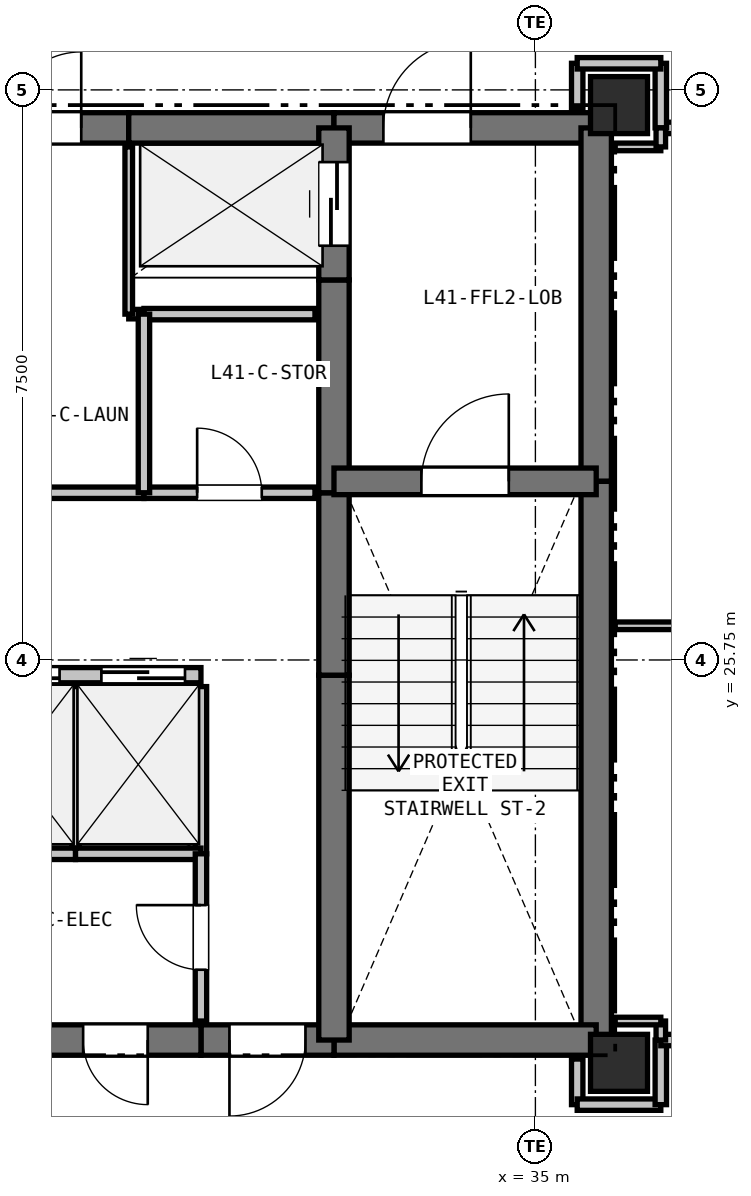
"""IFC4 building model, lengths in metres.
Left out: names, types, materials, properties, quantities, classifications, styles, units other than length and angle.
Written with IfcOpenShell. Run it as: python <this file> out.ifc"""

import sys

from ifc_helpers import new_model, si_unit, direction, frame, frame_2d, origin, origin_2d, place, context, subcontext, project, spatial, rectangle, extrude, element, fill, save


model = new_model("IFC4")
c1 = context("Model", 3, precision=1e-05, world=origin(), true_north=direction((0.0, 1.0)))
c2 = subcontext(c1, "Body", "Model", "MODEL_VIEW")
j1 = project(units=[si_unit("LENGTHUNIT", "METRE"), si_unit("PLANEANGLEUNIT", "RADIAN")], contexts=[c1])
p1 = place(None, origin())
s1 = spatial("IfcSite", under=j1, at=p1, CompositionType="ELEMENT")
p2 = place(p1, origin())
s2 = spatial("IfcBuilding", under=s1, at=p2, CompositionType="ELEMENT")
p3 = place(p2, frame((0.0, 0.0, 147.6)))
s3 = spatial("IfcBuildingStorey", under=s2, at=p3, CompositionType="ELEMENT", Elevation=147.6)
for number, where, z_axis, x_axis in (
    (1, (36.1, 33.05, 0.0), (0.0, 0.0, 1.0), (1.0, 0.0, 0.0)),
    (2, (36.1, 20.45, 0.0), (0.0, 0.0, 1.0), (1.0, 0.0, 0.0)),
):
    element("IfcColumn", number, at=place(p3, frame(where, z_axis=z_axis, x_axis=x_axis)), inside=s3, PredefinedType="COLUMN", context=c2, shape_type="SweptSolid", body=[
        extrude(rectangle(XDim=0.75, YDim=0.75, at=origin_2d()), origin(), (0.0, 0.0, 1.0), 3.3),
    ])
p4 = place(p3, frame((27.4, 32.75, 0.0), z_axis=(0.0, 0.0, 1.0), x_axis=(1.0, 0.0, 0.0)))
e3 = element("IfcWall", 3, at=p4, inside=s3, PredefinedType="SHEAR", context=c2, shape_type="SweptSolid", body=[
    extrude(rectangle(XDim=2.25, YDim=0.4, at=frame_2d((1.125, 0.0))), origin(), (0.0, 0.0, 1.0), 3.06),
])
p5 = place(p4, frame((0.625, 0.0, 0.0)))
e4 = element("IfcOpeningElement", 4, at=p5, cuts=e3, PredefinedType="OPENING", context=c2, shape_type="SweptSolid", body=[
    extrude(rectangle(XDim=1.0, YDim=2.15, at=frame_2d((0.5, 1.075))), frame((0.0, 0.21, 0.0), z_axis=(0.0, -1.0, 0.0), x_axis=(1.0, 0.0, 0.0)), (0.0, 0.0, 1.0), 0.42),
])
p6 = place(p3, frame((29.65, 32.75, 0.0), z_axis=(0.0, 0.0, 1.0), x_axis=(1.0, 0.0, 0.0)))
e5 = element("IfcWall", 5, at=p6, inside=s3, PredefinedType="SHEAR", context=c2, shape_type="SweptSolid", body=[
    extrude(rectangle(XDim=2.7, YDim=0.4, at=frame_2d((1.35, 0.0))), origin(), (0.0, 0.0, 1.0), 3.06),
])
p7 = place(p3, frame((32.35, 32.75, 0.0), z_axis=(0.0, 0.0, 1.0), x_axis=(1.0, 0.0, 0.0)))
e6 = element("IfcWall", 6, at=p7, inside=s3, PredefinedType="SHEAR", context=c2, shape_type="SweptSolid", body=[
    extrude(rectangle(XDim=3.45, YDim=0.4, at=frame_2d((1.725, 0.0))), origin(), (0.0, 0.0, 1.0), 3.06),
])
p8 = place(p7, frame((0.65, 0.0, 0.0)))
e7 = element("IfcOpeningElement", 7, at=p8, cuts=e6, PredefinedType="OPENING", context=c2, shape_type="SweptSolid", body=[
    extrude(rectangle(XDim=1.15, YDim=2.15, at=frame_2d((0.575, 1.075))), frame((0.0, 0.21, 0.0), z_axis=(0.0, -1.0, 0.0), x_axis=(1.0, 0.0, 0.0)), (0.0, 0.0, 1.0), 0.42),
])
p9 = place(p3, frame((35.8, 32.75, 0.0), z_axis=(0.0, 0.0, 1.0), x_axis=(0.0, -1.0, 0.0)))
e8 = element("IfcWall", 8, at=p9, inside=s3, PredefinedType="SHEAR", context=c2, shape_type="SweptSolid", body=[
    extrude(rectangle(XDim=4.65, YDim=0.4, at=frame_2d((2.325, 0.0))), origin(), (0.0, 0.0, 1.0), 3.06),
])
p10 = place(p3, frame((35.8, 28.1, 0.0), z_axis=(0.0, 0.0, 1.0), x_axis=(0.0, -1.0, 0.0)))
e9 = element("IfcWall", 9, at=p10, inside=s3, PredefinedType="SHEAR", context=c2, shape_type="SweptSolid", body=[
    extrude(rectangle(XDim=7.35, YDim=0.4, at=frame_2d((3.675, 0.0))), origin(), (0.0, 0.0, 1.0), 3.06),
])
p11 = place(p3, frame((35.8, 20.75, 0.0), z_axis=(0.0, 0.0, 1.0), x_axis=(-1.0, 0.0, 0.0)))
e10 = element("IfcWall", 10, at=p11, inside=s3, PredefinedType="SHEAR", context=c2, shape_type="SweptSolid", body=[
    extrude(rectangle(XDim=3.45, YDim=0.4, at=frame_2d((1.725, 0.0))), origin(), (0.0, 0.0, 1.0), 3.06),
])
p12 = place(p3, frame((32.35, 20.75, 0.0), z_axis=(0.0, 0.0, 1.0), x_axis=(-1.0, 0.0, 0.0)))
e11 = element("IfcWall", 11, at=p12, inside=s3, PredefinedType="SHEAR", context=c2, shape_type="SweptSolid", body=[
    extrude(rectangle(XDim=1.75, YDim=0.4, at=frame_2d((0.875, 0.0))), origin(), (0.0, 0.0, 1.0), 3.06),
])
p13 = place(p12, frame((0.375, 0.0, 0.0)))
e12 = element("IfcOpeningElement", 12, at=p13, cuts=e11, PredefinedType="OPENING", context=c2, shape_type="SweptSolid", body=[
    extrude(rectangle(XDim=1.0, YDim=2.15, at=frame_2d((0.5, 1.075))), frame((0.0, 0.21, 0.0), z_axis=(0.0, -1.0, 0.0), x_axis=(1.0, 0.0, 0.0)), (0.0, 0.0, 1.0), 0.42),
])
p14 = place(p3, frame((30.6, 20.75, 0.0), z_axis=(0.0, 0.0, 1.0), x_axis=(-1.0, 0.0, 0.0)))
e13 = element("IfcWall", 13, at=p14, inside=s3, PredefinedType="SHEAR", context=c2, shape_type="SweptSolid", body=[
    extrude(rectangle(XDim=2.25, YDim=0.4, at=frame_2d((1.125, 0.0))), origin(), (0.0, 0.0, 1.0), 3.06),
])
p15 = place(p14, frame((0.7, 0.0, 0.0)))
e14 = element("IfcOpeningElement", 14, at=p15, cuts=e13, PredefinedType="OPENING", context=c2, shape_type="SweptSolid", body=[
    extrude(rectangle(XDim=0.85, YDim=2.1, at=frame_2d((0.425, 1.05))), frame((0.0, 0.21, 0.0), z_axis=(0.0, -1.0, 0.0), x_axis=(1.0, 0.0, 0.0)), (0.0, 0.0, 1.0), 0.42),
])
p16 = place(p3, frame((32.35, 20.75, 0.0), z_axis=(0.0, 0.0, 1.0), x_axis=(0.0, 1.0, 0.0)))
e15 = element("IfcWall", 15, at=p16, inside=s3, PredefinedType="SHEAR", context=c2, shape_type="SweptSolid", body=[
    extrude(rectangle(XDim=4.8, YDim=0.4, at=frame_2d((2.4, 0.0))), origin(), (0.0, 0.0, 1.0), 3.06),
])
p17 = place(p3, frame((32.35, 25.55, 0.0), z_axis=(0.0, 0.0, 1.0), x_axis=(0.0, 1.0, 0.0)))
e16 = element("IfcWall", 16, at=p17, inside=s3, PredefinedType="SHEAR", context=c2, shape_type="SweptSolid", body=[
    extrude(rectangle(XDim=2.4, YDim=0.4, at=frame_2d((1.2, 0.0))), origin(), (0.0, 0.0, 1.0), 3.06),
])
p18 = place(p3, frame((32.35, 27.95, 0.0), z_axis=(0.0, 0.0, 1.0), x_axis=(0.0, 1.0, 0.0)))
e17 = element("IfcWall", 17, at=p18, inside=s3, PredefinedType="SHEAR", context=c2, shape_type="SweptSolid", body=[
    extrude(rectangle(XDim=2.8, YDim=0.4, at=frame_2d((1.4, 0.0))), origin(), (0.0, 0.0, 1.0), 3.06),
])
p19 = place(p3, frame((32.35, 30.75, 0.0), z_axis=(0.0, 0.0, 1.0), x_axis=(0.0, 1.0, 0.0)))
e18 = element("IfcWall", 18, at=p19, inside=s3, PredefinedType="SHEAR", context=c2, shape_type="SweptSolid", body=[
    extrude(rectangle(XDim=2.0, YDim=0.4, at=frame_2d((1.0, 0.0))), origin(), (0.0, 0.0, 1.0), 3.06),
])
p20 = place(p19, frame((0.45, 0.0, 0.0)))
e19 = element("IfcOpeningElement", 19, at=p20, cuts=e18, PredefinedType="OPENING", context=c2, shape_type="SweptSolid", body=[
    extrude(rectangle(XDim=1.1, YDim=2.15, at=frame_2d((0.55, 1.075))), frame((0.0, 0.21, 0.0), z_axis=(0.0, -1.0, 0.0), x_axis=(1.0, 0.0, 0.0)), (0.0, 0.0, 1.0), 0.42),
])
p21 = place(p3, frame((32.35, 28.1, 0.0), z_axis=(0.0, 0.0, 1.0), x_axis=(1.0, 0.0, 0.0)))
e20 = element("IfcWall", 20, at=p21, inside=s3, PredefinedType="SHEAR", context=c2, shape_type="SweptSolid", body=[
    extrude(rectangle(XDim=3.45, YDim=0.35, at=frame_2d((1.725, 0.0))), origin(), (0.0, 0.0, 1.0), 3.06),
])
p22 = place(p21, frame((1.15, 0.0, 0.0)))
e21 = element("IfcOpeningElement", 21, at=p22, cuts=e20, PredefinedType="OPENING", context=c2, shape_type="SweptSolid", body=[
    extrude(rectangle(XDim=1.15, YDim=2.15, at=frame_2d((0.575, 1.075))), frame((0.0, 0.185, 0.0), z_axis=(0.0, -1.0, 0.0), x_axis=(1.0, 0.0, 0.0)), (0.0, 0.0, 1.0), 0.37),
])
p23 = place(p3, frame((25.65, 25.55, 0.0), z_axis=(0.0, 0.0, 1.0), x_axis=(1.0, 0.0, 0.0)))
e22 = element("IfcWall", 22, at=p23, inside=s3, PredefinedType="PARTITIONING", context=c2, shape_type="SweptSolid", body=[
    extrude(rectangle(XDim=4.95, YDim=0.2, at=frame_2d((2.475, 0.0))), origin(), (0.0, 0.0, 1.0), 3.06),
])
p24 = place(p23, frame((0.34, 0.0, 0.0)))
e23 = element("IfcOpeningElement", 23, at=p24, cuts=e22, PredefinedType="OPENING", context=c2, shape_type="SweptSolid", body=[
    extrude(rectangle(XDim=1.1, YDim=2.15, at=frame_2d((0.55, 1.075))), frame((0.0, 0.11, 0.0), z_axis=(0.0, -1.0, 0.0), x_axis=(1.0, 0.0, 0.0)), (0.0, 0.0, 1.0), 0.22),
])
p25 = place(p23, frame((1.99, 0.0, 0.0)))
e24 = element("IfcOpeningElement", 24, at=p25, cuts=e22, PredefinedType="OPENING", context=c2, shape_type="SweptSolid", body=[
    extrude(rectangle(XDim=1.1, YDim=2.15, at=frame_2d((0.55, 1.075))), frame((0.0, 0.11, 0.0), z_axis=(0.0, -1.0, 0.0), x_axis=(1.0, 0.0, 0.0)), (0.0, 0.0, 1.0), 0.22),
])
p26 = place(p23, frame((3.64, 0.0, 0.0)))
e25 = element("IfcOpeningElement", 25, at=p26, cuts=e22, PredefinedType="OPENING", context=c2, shape_type="SweptSolid", body=[
    extrude(rectangle(XDim=1.1, YDim=2.15, at=frame_2d((0.55, 1.075))), frame((0.0, 0.11, 0.0), z_axis=(0.0, -1.0, 0.0), x_axis=(1.0, 0.0, 0.0)), (0.0, 0.0, 1.0), 0.22),
])
p27 = place(p3, frame((32.1, 30.3, 0.0), z_axis=(0.0, 0.0, 1.0), x_axis=(-1.0, 0.0, 0.0)))
e26 = element("IfcWall", 26, at=p27, inside=s3, PredefinedType="PARTITIONING", context=c2, shape_type="SweptSolid", body=[
    extrude(rectangle(XDim=2.25, YDim=0.15, at=frame_2d((1.125, 0.0))), origin(), (0.0, 0.0, 1.0), 3.06),
])
p28 = place(p3, frame((29.85, 30.3, 0.0), z_axis=(0.0, 0.0, 1.0), x_axis=(-1.0, 0.0, 0.0)))
e27 = element("IfcWall", 27, at=p28, inside=s3, PredefinedType="PARTITIONING", context=c2, shape_type="SweptSolid", body=[
    extrude(rectangle(XDim=0.2, YDim=0.125, at=frame_2d((0.1, 0.0))), origin(), (0.0, 0.0, 1.0), 3.06),
])
for number, where, z_axis, x_axis in (
    (28, (29.65, 30.3, 0.0), (0.0, 0.0, 1.0), (0.0, 1.0, 0.0)),
    (29, (28.95, 25.4, 0.0), (0.0, 0.0, 1.0), (0.0, -1.0, 0.0)),
):
    element("IfcWall", number, at=place(p3, frame(where, z_axis=z_axis, x_axis=x_axis)), inside=s3, PredefinedType="PARTITIONING", context=c2, shape_type="SweptSolid", body=[
        extrude(rectangle(XDim=2.2, YDim=0.1, at=frame_2d((1.1, 0.0))), origin(), (0.0, 0.0, 1.0), 3.06),
    ])
p29 = place(p3, frame((28.95, 23.2, 0.0), z_axis=(0.0, 0.0, 1.0), x_axis=(-1.0, 0.0, 0.0)))
e30 = element("IfcWall", 30, at=p29, inside=s3, PredefinedType="PARTITIONING", context=c2, shape_type="SweptSolid", body=[
    extrude(rectangle(XDim=0.6, YDim=0.15, at=frame_2d((0.3, 0.0))), origin(), (0.0, 0.0, 1.0), 3.06),
])
p30 = place(p3, frame((30.6, 25.4, 0.0), z_axis=(0.0, 0.0, 1.0), x_axis=(0.0, -1.0, 0.0)))
e31 = element("IfcWall", 31, at=p30, inside=s3, PredefinedType="PARTITIONING", context=c2, shape_type="SweptSolid", body=[
    extrude(rectangle(XDim=2.2, YDim=0.15, at=frame_2d((1.1, 0.0))), origin(), (0.0, 0.0, 1.0), 3.06),
])
p31 = place(p3, frame((30.6, 23.2, 0.0), z_axis=(0.0, 0.0, 1.0), x_axis=(-1.0, 0.0, 0.0)))
e32 = element("IfcWall", 32, at=p31, inside=s3, PredefinedType="PARTITIONING", context=c2, shape_type="SweptSolid", body=[
    extrude(rectangle(XDim=1.65, YDim=0.15, at=frame_2d((0.825, 0.0))), origin(), (0.0, 0.0, 1.0), 3.06),
])
p32 = place(p3, frame((30.6, 21.0, 0.0), z_axis=(0.0, 0.0, 1.0), x_axis=(0.0, 1.0, 0.0)))
e33 = element("IfcWall", 33, at=p32, inside=s3, PredefinedType="PARTITIONING", context=c2, shape_type="SweptSolid", body=[
    extrude(rectangle(XDim=2.2, YDim=0.15, at=frame_2d((1.1, 0.0))), origin(), (0.0, 0.0, 1.0), 3.06),
])
p33 = place(p32, frame((0.675, 0.0, 0.0)))
e34 = element("IfcOpeningElement", 34, at=p33, cuts=e33, PredefinedType="OPENING", context=c2, shape_type="SweptSolid", body=[
    extrude(rectangle(XDim=0.85, YDim=2.1, at=frame_2d((0.425, 1.05))), frame((0.0, 0.085, 0.0), z_axis=(0.0, -1.0, 0.0), x_axis=(1.0, 0.0, 0.0)), (0.0, 0.0, 1.0), 0.17),
])
p34 = place(p3, frame((27.4, 27.95, 0.0), z_axis=(0.0, 0.0, 1.0), x_axis=(1.0, 0.0, 0.0)))
e35 = element("IfcWall", 35, at=p34, inside=s3, PredefinedType="PARTITIONING", context=c2, shape_type="SweptSolid", body=[
    extrude(rectangle(XDim=2.45, YDim=0.15, at=frame_2d((1.225, 0.0))), origin(), (0.0, 0.0, 1.0), 3.06),
])
p35 = place(p3, frame((29.85, 27.95, 0.0), z_axis=(0.0, 0.0, 1.0), x_axis=(1.0, 0.0, 0.0)))
e36 = element("IfcWall", 36, at=p35, inside=s3, PredefinedType="PARTITIONING", context=c2, shape_type="SweptSolid", body=[
    extrude(rectangle(XDim=2.25, YDim=0.15, at=frame_2d((1.125, 0.0))), origin(), (0.0, 0.0, 1.0), 3.06),
])
p36 = place(p35, frame((0.7, 0.0, 0.0)))
e37 = element("IfcOpeningElement", 37, at=p36, cuts=e36, PredefinedType="OPENING", context=c2, shape_type="SweptSolid", body=[
    extrude(rectangle(XDim=0.85, YDim=2.1, at=frame_2d((0.425, 1.05))), frame((0.0, 0.085, 0.0), z_axis=(0.0, -1.0, 0.0), x_axis=(1.0, 0.0, 0.0)), (0.0, 0.0, 1.0), 0.17),
])
p37 = place(p3, frame((35.55, 33.6, 0.0), z_axis=(0.0, 0.0, 1.0), x_axis=(0.0, -1.0, 0.0)))
e38 = element("IfcWall", 38, at=p37, inside=s3, PredefinedType="PARTITIONING", context=c2, shape_type="SweptSolid", body=[
    extrude(rectangle(XDim=0.6, YDim=0.15, at=frame_2d((0.3, 0.0))), origin(), (0.0, 0.0, 1.0), 2.585),
])
p38 = place(p3, frame((39.2, 32.75, 0.0), z_axis=(0.0, 0.0, 1.0), x_axis=(-1.0, 0.0, 0.0)))
e39 = element("IfcWall", 39, at=p38, inside=s3, PredefinedType="PARTITIONING", context=c2, shape_type="SweptSolid", body=[
    extrude(rectangle(XDim=2.55, YDim=0.15, at=frame_2d((1.275, 0.0))), origin(), (0.0, 0.0, 1.0), 3.06),
])
p39 = place(p38, frame((0.775, 0.0, 0.0)))
e40 = element("IfcOpeningElement", 40, at=p39, cuts=e39, PredefinedType="OPENING", context=c2, shape_type="SweptSolid", body=[
    extrude(rectangle(XDim=1.0, YDim=2.15, at=frame_2d((0.5, 1.075))), frame((0.0, 0.085, 0.0), z_axis=(0.0, -1.0, 0.0), x_axis=(1.0, 0.0, 0.0)), (0.0, 0.0, 1.0), 0.17),
])
p40 = place(p3, frame((36.65, 32.75, 0.0), z_axis=(0.0, 0.0, 1.0), x_axis=(0.0, 1.0, 0.0)))
e41 = element("IfcWall", 41, at=p40, inside=s3, PredefinedType="PARTITIONING", context=c2, shape_type="SweptSolid", body=[
    extrude(rectangle(XDim=0.85, YDim=0.15, at=frame_2d((0.425, 0.0))), origin(), (0.0, 0.0, 1.0), 2.433),
])
p41 = place(p3, frame((36.65, 33.6, 0.0), z_axis=(0.0, 0.0, 1.0), x_axis=(-1.0, 0.0, 0.0)))
e42 = element("IfcWall", 42, at=p41, inside=s3, PredefinedType="PARTITIONING", context=c2, shape_type="SweptSolid", body=[
    extrude(rectangle(XDim=1.1, YDim=0.15, at=frame_2d((0.55, 0.0))), origin(), (0.0, 0.0, 1.0), 2.433),
])
p42 = place(p3, frame((35.55, 20.5, 0.0), z_axis=(0.0, 0.0, 1.0), x_axis=(0.0, -1.0, 0.0)))
e43 = element("IfcWall", 43, at=p42, inside=s3, PredefinedType="PARTITIONING", context=c2, shape_type="SweptSolid", body=[
    extrude(rectangle(XDim=0.6, YDim=0.15, at=frame_2d((0.3, 0.0))), origin(), (0.0, 0.0, 1.0), 2.585),
])
p43 = place(p3, frame((35.55, 19.9, 0.0), z_axis=(0.0, 0.0, 1.0), x_axis=(1.0, 0.0, 0.0)))
e44 = element("IfcWall", 44, at=p43, inside=s3, PredefinedType="PARTITIONING", context=c2, shape_type="SweptSolid", body=[
    extrude(rectangle(XDim=1.1, YDim=0.15, at=frame_2d((0.55, 0.0))), origin(), (0.0, 0.0, 1.0), 2.433),
])
p44 = place(p3, frame((36.65, 19.9, 0.0), z_axis=(0.0, 0.0, 1.0), x_axis=(0.0, 1.0, 0.0)))
e45 = element("IfcWall", 45, at=p44, inside=s3, PredefinedType="PARTITIONING", context=c2, shape_type="SweptSolid", body=[
    extrude(rectangle(XDim=0.85, YDim=0.15, at=frame_2d((0.425, 0.0))), origin(), (0.0, 0.0, 1.0), 3.06),
])
p45 = place(p3, frame((36.65, 20.75, 0.0), z_axis=(0.0, 0.0, 1.0), x_axis=(1.0, 0.0, 0.0)))
e46 = element("IfcWall", 46, at=p45, inside=s3, PredefinedType="PARTITIONING", context=c2, shape_type="SweptSolid", body=[
    extrude(rectangle(XDim=2.55, YDim=0.15, at=frame_2d((1.275, 0.0))), origin(), (0.0, 0.0, 1.0), 3.06),
])
p46 = place(p45, frame((0.775, 0.0, 0.0)))
e47 = element("IfcOpeningElement", 47, at=p46, cuts=e46, PredefinedType="OPENING", context=c2, shape_type="SweptSolid", body=[
    extrude(rectangle(XDim=1.0, YDim=2.15, at=frame_2d((0.5, 1.075))), frame((0.0, 0.085, 0.0), z_axis=(0.0, -1.0, 0.0), x_axis=(1.0, 0.0, 0.0)), (0.0, 0.0, 1.0), 0.17),
])
p47 = place(p3, frame((29.85, 30.3, 0.0), z_axis=(0.0, 0.0, 1.0), x_axis=(0.0, -1.0, 0.0)))
e48 = element("IfcWall", 48, at=p47, inside=s3, PredefinedType="PARTITIONING", context=c2, shape_type="SweptSolid", body=[
    extrude(rectangle(XDim=2.35, YDim=0.15, at=frame_2d((1.175, 0.0))), origin(), (0.0, 0.0, 1.0), 3.06),
])
p48 = place(p3, frame((36.05, 32.5, 0.0), z_axis=(0.0, 0.0, 1.0), x_axis=(1.0, 0.0, 0.0)))
e49 = element("IfcWall", 49, at=p48, inside=s3, PredefinedType="PARTITIONING", context=c2, shape_type="SweptSolid", body=[
    extrude(rectangle(XDim=0.6, YDim=0.1, at=frame_2d((0.3, 0.0))), origin(), (0.0, 0.0, 1.0), 2.585),
])
p49 = place(p3, frame((36.65, 32.5, 0.0), z_axis=(0.0, 0.0, 1.0), x_axis=(0.0, 1.0, 0.0)))
e50 = element("IfcWall", 50, at=p49, inside=s3, PredefinedType="PARTITIONING", context=c2, shape_type="SweptSolid", body=[
    extrude(rectangle(XDim=0.25, YDim=0.125, at=frame_2d((0.125, 0.0))), origin(), (0.0, 0.0, 1.0), 3.06),
])
p50 = place(p3, frame((42.181, 26.2, 0.0), z_axis=(0.0, 0.0, 1.0), x_axis=(-1.0, 0.0, 0.0)))
e51 = element("IfcWall", 51, at=p50, inside=s3, PredefinedType="PARTITIONING", context=c2, shape_type="SweptSolid", body=[
    extrude(rectangle(XDim=6.131, YDim=0.1, at=frame_2d((3.065, 0.0))), origin(), (0.0, 0.0, 1.0), 2.365),
])
p51 = place(p3, frame((36.65, 20.75, 0.0), z_axis=(0.0, 0.0, 1.0), x_axis=(0.0, 1.0, 0.0)))
e52 = element("IfcWall", 52, at=p51, inside=s3, PredefinedType="PARTITIONING", context=c2, shape_type="SweptSolid", body=[
    extrude(rectangle(XDim=0.25, YDim=0.125, at=frame_2d((0.125, 0.0))), origin(), (0.0, 0.0, 1.0), 3.06),
])
p52 = place(p3, frame((36.65, 21.0, 0.0), z_axis=(0.0, 0.0, 1.0), x_axis=(-1.0, 0.0, 0.0)))
e53 = element("IfcWall", 53, at=p52, inside=s3, PredefinedType="PARTITIONING", context=c2, shape_type="SweptSolid", body=[
    extrude(rectangle(XDim=0.6, YDim=0.1, at=frame_2d((0.3, 0.0))), origin(), (0.0, 0.0, 1.0), 2.585),
])
p53 = place(p25, origin())
e54 = element("IfcDoor", 54, at=p53, inside=s3, OperationType="SLIDING_TO_LEFT", PredefinedType="DOOR", context=c2, shape_type="SweptSolid", body=[
    extrude(rectangle(XDim=1.1, YDim=2.15, at=frame_2d((0.55, 1.075))), frame((0.0, 0.025, 0.0), z_axis=(0.0, -1.0, 0.0), x_axis=(1.0, 0.0, 0.0)), (0.0, 0.0, 1.0), 0.05),
])
fill(e24, e54)
p54 = place(p26, origin())
e55 = element("IfcDoor", 55, at=p54, inside=s3, OperationType="SLIDING_TO_LEFT", PredefinedType="DOOR", context=c2, shape_type="SweptSolid", body=[
    extrude(rectangle(XDim=1.1, YDim=2.15, at=frame_2d((0.55, 1.075))), frame((0.0, 0.025, 0.0), z_axis=(0.0, -1.0, 0.0), x_axis=(1.0, 0.0, 0.0)), (0.0, 0.0, 1.0), 0.05),
])
fill(e25, e55)
p55 = place(p13, origin())
e56 = element("IfcDoor", 56, at=p55, inside=s3, OperationType="SINGLE_SWING_RIGHT", PredefinedType="DOOR", context=c2, shape_type="SweptSolid", body=[
    extrude(rectangle(XDim=1.0, YDim=2.15, at=frame_2d((0.5, 1.075))), frame((0.0, 0.025, 0.0), z_axis=(0.0, -1.0, 0.0), x_axis=(1.0, 0.0, 0.0)), (0.0, 0.0, 1.0), 0.05),
])
fill(e12, e56)
p56 = place(p20, origin())
e57 = element("IfcDoor", 57, at=p56, inside=s3, OperationType="SLIDING_TO_LEFT", PredefinedType="DOOR", context=c2, shape_type="SweptSolid", body=[
    extrude(rectangle(XDim=1.1, YDim=2.15, at=frame_2d((0.55, 1.075))), frame((0.0, 0.025, 0.0), z_axis=(0.0, -1.0, 0.0), x_axis=(1.0, 0.0, 0.0)), (0.0, 0.0, 1.0), 0.05),
])
fill(e19, e57)
p57 = place(p22, origin())
e58 = element("IfcDoor", 58, at=p57, inside=s3, OperationType="SINGLE_SWING_RIGHT", PredefinedType="DOOR", context=c2, shape_type="SweptSolid", body=[
    extrude(rectangle(XDim=1.15, YDim=2.15, at=frame_2d((0.575, 1.075))), frame((0.0, 0.025, 0.0), z_axis=(0.0, -1.0, 0.0), x_axis=(1.0, 0.0, 0.0)), (0.0, 0.0, 1.0), 0.05),
])
fill(e21, e58)
p58 = place(p8, origin())
e59 = element("IfcDoor", 59, at=p58, inside=s3, OperationType="SINGLE_SWING_RIGHT", PredefinedType="DOOR", context=c2, shape_type="SweptSolid", body=[
    extrude(rectangle(XDim=1.15, YDim=2.15, at=frame_2d((0.575, 1.075))), frame((0.0, 0.025, 0.0), z_axis=(0.0, -1.0, 0.0), x_axis=(1.0, 0.0, 0.0)), (0.0, 0.0, 1.0), 0.05),
])
fill(e7, e59)
p59 = place(p36, origin())
e60 = element("IfcDoor", 60, at=p59, inside=s3, OperationType="SINGLE_SWING_LEFT", PredefinedType="DOOR", context=c2, shape_type="SweptSolid", body=[
    extrude(rectangle(XDim=0.85, YDim=2.1, at=frame_2d((0.425, 1.05))), frame((0.0, 0.025, 0.0), z_axis=(0.0, -1.0, 0.0), x_axis=(1.0, 0.0, 0.0)), (0.0, 0.0, 1.0), 0.05),
])
fill(e37, e60)
p60 = place(p33, origin())
e61 = element("IfcDoor", 61, at=p60, inside=s3, OperationType="SINGLE_SWING_RIGHT", PredefinedType="DOOR", context=c2, shape_type="SweptSolid", body=[
    extrude(rectangle(XDim=0.85, YDim=2.1, at=frame_2d((0.425, 1.05))), frame((0.0, 0.025, 0.0), z_axis=(0.0, -1.0, 0.0), x_axis=(1.0, 0.0, 0.0)), (0.0, 0.0, 1.0), 0.05),
])
fill(e34, e61)
p61 = place(p5, origin())
e62 = element("IfcDoor", 62, at=p61, inside=s3, OperationType="SINGLE_SWING_RIGHT", PredefinedType="DOOR", context=c2, shape_type="SweptSolid", body=[
    extrude(rectangle(XDim=1.0, YDim=2.15, at=frame_2d((0.5, 1.075))), frame((0.0, 0.025, 0.0), z_axis=(0.0, -1.0, 0.0), x_axis=(1.0, 0.0, 0.0)), (0.0, 0.0, 1.0), 0.05),
])
fill(e4, e62)
p62 = place(p15, origin())
e63 = element("IfcDoor", 63, at=p62, inside=s3, OperationType="SINGLE_SWING_LEFT", PredefinedType="DOOR", context=c2, shape_type="SweptSolid", body=[
    extrude(rectangle(XDim=0.85, YDim=2.1, at=frame_2d((0.425, 1.05))), frame((0.0, 0.025, 0.0), z_axis=(0.0, -1.0, 0.0), x_axis=(1.0, 0.0, 0.0)), (0.0, 0.0, 1.0), 0.05),
])
fill(e14, e63)
save(model, sys.argv[1])
